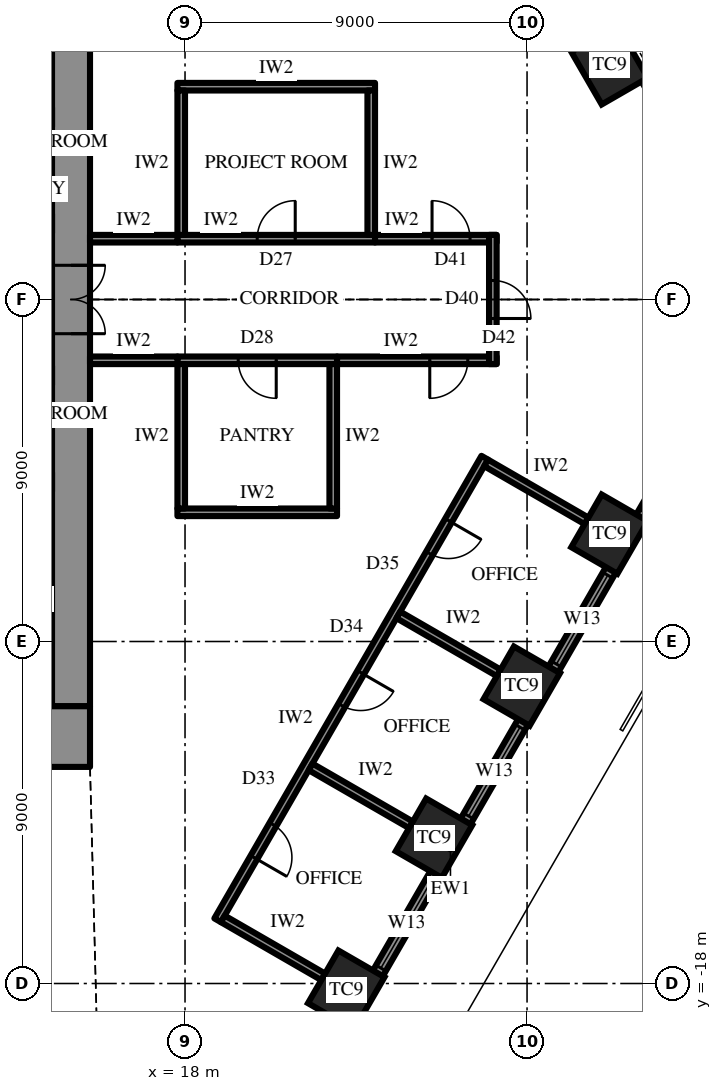
"""IFC4 building model, lengths in metres.
Left out: names, types, materials, properties, quantities, classifications, styles, units other than length and angle.
Written with IfcOpenShell. Run it as: python <this file> out.ifc"""

import sys

from ifc_helpers import new_model, si_unit, direction, frame, frame_2d, origin, origin_2d, place, context, subcontext, project, spatial, rectangle, extrude, element, fill, save


model = new_model("IFC4")
c1 = context("Model", 3, precision=1e-05, world=origin(), true_north=direction((0.0, 1.0)))
c2 = subcontext(c1, "Body", "Model", "MODEL_VIEW")
j1 = project(units=[si_unit("LENGTHUNIT", "METRE"), si_unit("PLANEANGLEUNIT", "RADIAN")], contexts=[c1])
p1 = place(None, origin())
s1 = spatial("IfcSite", under=j1, at=p1, CompositionType="ELEMENT")
p2 = place(p1, origin())
s2 = spatial("IfcBuilding", under=s1, at=p2, CompositionType="ELEMENT")
p3 = place(p2, frame((0.0, 0.0, 223.9)))
s3 = spatial("IfcBuildingStorey", under=s2, at=p3, CompositionType="ELEMENT", Elevation=223.9)
for number, where, z_axis, x_axis in (
    (1, (29.171, 6.175, 0.0), (0.0, 0.0, 1.0), (-0.5, 0.866, 0.0)),
    (2, (22.242, -18.175, 0.0), (0.0, 0.0, 1.0), (0.5, 0.866, 0.0)),
    (3, (24.552, -14.175, 0.0), (0.0, 0.0, 1.0), (0.5, 0.866, 0.0)),
    (4, (26.861, -10.175, 0.0), (0.0, 0.0, 1.0), (0.5, 0.866, 0.0)),
    (5, (29.171, -6.175, 0.0), (0.0, 0.0, 1.0), (0.5, 0.866, 0.0)),
):
    element("IfcColumn", number, at=place(p3, frame(where, z_axis=z_axis, x_axis=x_axis)), inside=s3, PredefinedType="COLUMN", context=c2, shape_type="SweptSolid", body=[
        extrude(rectangle(XDim=1.6, YDim=1.4, at=origin_2d()), origin(), (0.0, 0.0, 1.0), 4.2),
    ])
p4 = place(p3, frame((15.5, -11.5, 0.0), z_axis=(0.0, 0.0, 1.0), x_axis=(-1.0, 0.0, 0.0)))
e6 = element("IfcWall", 6, at=p4, inside=s3, PredefinedType="SHEAR", context=c2, shape_type="SweptSolid", body=[
    extrude(rectangle(XDim=31.0, YDim=1.6, at=frame_2d((15.5, 0.0))), origin(), (0.0, 0.0, 1.0), 4.2),
])
p5 = place(p4, frame((16.35, 0.0, 0.0)))
e7 = element("IfcOpeningElement", 7, at=p5, cuts=e6, PredefinedType="OPENING", context=c2, shape_type="SweptSolid", body=[
    extrude(rectangle(XDim=0.9, YDim=2.2, at=frame_2d((0.45, 1.1))), frame((0.0, 0.81, 0.0), z_axis=(0.0, -1.0, 0.0), x_axis=(1.0, 0.0, 0.0)), (0.0, 0.0, 1.0), 1.62),
])
p6 = place(p4, frame((19.35, 0.0, 0.0)))
e8 = element("IfcOpeningElement", 8, at=p6, cuts=e6, PredefinedType="OPENING", context=c2, shape_type="SweptSolid", body=[
    extrude(rectangle(XDim=0.9, YDim=2.2, at=frame_2d((0.45, 1.1))), frame((0.0, 0.81, 0.0), z_axis=(0.0, -1.0, 0.0), x_axis=(1.0, 0.0, 0.0)), (0.0, 0.0, 1.0), 1.62),
])
p7 = place(p4, frame((22.4, 0.0, 0.0)))
e9 = element("IfcOpeningElement", 9, at=p7, cuts=e6, PredefinedType="OPENING", context=c2, shape_type="SweptSolid", body=[
    extrude(rectangle(XDim=1.0, YDim=2.2, at=frame_2d((0.5, 1.1))), frame((0.0, 0.81, 0.0), z_axis=(0.0, -1.0, 0.0), x_axis=(1.0, 0.0, 0.0)), (0.0, 0.0, 1.0), 1.62),
])
p8 = place(p4, frame((1.65, 0.0, 0.0)))
e10 = element("IfcOpeningElement", 10, at=p8, cuts=e6, PredefinedType="OPENING", context=c2, shape_type="SweptSolid", body=[
    extrude(rectangle(XDim=0.9, YDim=2.2, at=frame_2d((0.45, 1.1))), frame((0.0, 0.81, 0.0), z_axis=(0.0, -1.0, 0.0), x_axis=(1.0, 0.0, 0.0)), (0.0, 0.0, 1.0), 1.62),
])
p9 = place(p4, frame((4.65, 0.0, 0.0)))
e11 = element("IfcOpeningElement", 11, at=p9, cuts=e6, PredefinedType="OPENING", context=c2, shape_type="SweptSolid", body=[
    extrude(rectangle(XDim=0.9, YDim=2.2, at=frame_2d((0.45, 1.1))), frame((0.0, 0.81, 0.0), z_axis=(0.0, -1.0, 0.0), x_axis=(1.0, 0.0, 0.0)), (0.0, 0.0, 1.0), 1.62),
])
p10 = place(p4, frame((25.45, 0.0, 0.0)))
e12 = element("IfcOpeningElement", 12, at=p10, cuts=e6, PredefinedType="OPENING", context=c2, shape_type="SweptSolid", body=[
    extrude(rectangle(XDim=0.9, YDim=2.2, at=frame_2d((0.45, 1.1))), frame((0.0, 0.81, 0.0), z_axis=(0.0, -1.0, 0.0), x_axis=(1.0, 0.0, 0.0)), (0.0, 0.0, 1.0), 1.62),
])
p11 = place(p4, frame((28.45, 0.0, 0.0)))
e13 = element("IfcOpeningElement", 13, at=p11, cuts=e6, PredefinedType="OPENING", context=c2, shape_type="SweptSolid", body=[
    extrude(rectangle(XDim=0.9, YDim=2.2, at=frame_2d((0.45, 1.1))), frame((0.0, 0.81, 0.0), z_axis=(0.0, -1.0, 0.0), x_axis=(1.0, 0.0, 0.0)), (0.0, 0.0, 1.0), 1.62),
])
p12 = place(p3, frame((15.0, -10.7, 0.0), z_axis=(0.0, 0.0, 1.0), x_axis=(0.0, 1.0, 0.0)))
e14 = element("IfcWall", 14, at=p12, inside=s3, PredefinedType="SHEAR", context=c2, shape_type="SweptSolid", body=[
    extrude(rectangle(XDim=21.4, YDim=1.0, at=frame_2d((10.7, 0.0))), origin(), (0.0, 0.0, 1.0), 4.2),
])
p13 = place(p12, frame((9.8, 0.0, 0.0)))
e15 = element("IfcOpeningElement", 15, at=p13, cuts=e14, PredefinedType="OPENING", context=c2, shape_type="SweptSolid", body=[
    extrude(rectangle(XDim=1.8, YDim=2.4, at=frame_2d((0.9, 1.2))), frame((0.0, 0.51, 0.0), z_axis=(0.0, -1.0, 0.0), x_axis=(1.0, 0.0, 0.0)), (0.0, 0.0, 1.0), 1.02),
])
p14 = place(p3, frame((12.3, 2.0, 0.0), z_axis=(0.0, 0.0, 1.0), x_axis=(1.0, 0.0, 0.0)))
e16 = element("IfcWall", 16, at=p14, inside=s3, PredefinedType="SHEAR", context=c2, shape_type="SweptSolid", body=[
    extrude(rectangle(XDim=2.2, YDim=0.5, at=frame_2d((1.1, 0.0))), origin(), (0.0, 0.0, 1.0), 4.2),
])
p15 = place(p14, frame((0.8, 0.0, 0.0)))
e17 = element("IfcOpeningElement", 17, at=p15, cuts=e16, PredefinedType="OPENING", context=c2, shape_type="SweptSolid", body=[
    extrude(rectangle(XDim=0.9, YDim=2.2, at=frame_2d((0.45, 1.1))), frame((0.0, 0.26, 0.0), z_axis=(0.0, -1.0, 0.0), x_axis=(1.0, 0.0, 0.0)), (0.0, 0.0, 1.0), 0.52),
])
p16 = place(p3, frame((12.3, 4.8, 0.0), z_axis=(0.0, 0.0, 1.0), x_axis=(1.0, 0.0, 0.0)))
e18 = element("IfcWall", 18, at=p16, inside=s3, PredefinedType="SHEAR", context=c2, shape_type="SweptSolid", body=[
    extrude(rectangle(XDim=2.2, YDim=0.5, at=frame_2d((1.1, 0.0))), origin(), (0.0, 0.0, 1.0), 4.2),
])
p17 = place(p3, frame((18.057, -26.425, 0.0), z_axis=(0.0, 0.0, 1.0), x_axis=(0.500001051461, 0.866024796723, 0.0)))
e19 = element("IfcWall", 19, at=p17, inside=s3, PredefinedType="SOLIDWALL", context=c2, shape_type="SweptSolid", body=[
    extrude(rectangle(XDim=27.713, YDim=0.3, at=frame_2d((13.856, 0.0))), origin(), (0.0, 0.0, 1.0), 2.0),
])
p18 = place(p17, frame((0.959, 0.0, 0.6)))
e20 = element("IfcOpeningElement", 20, at=p18, cuts=e19, PredefinedType="OPENING", context=c2, shape_type="SweptSolid", body=[
    extrude(rectangle(XDim=2.7, YDim=1.15, at=frame_2d((1.35, 0.575))), frame((0.0, 0.16, 0.0), z_axis=(0.0, -1.0, 0.0), x_axis=(1.0, 0.0, 0.0)), (0.0, 0.0, 1.0), 0.32),
])
p19 = place(p17, frame((5.578, 0.0, 0.6)))
e21 = element("IfcOpeningElement", 21, at=p19, cuts=e19, PredefinedType="OPENING", context=c2, shape_type="SweptSolid", body=[
    extrude(rectangle(XDim=2.7, YDim=1.15, at=frame_2d((1.35, 0.575))), frame((0.0, 0.16, 0.0), z_axis=(0.0, -1.0, 0.0), x_axis=(1.0, 0.0, 0.0)), (0.0, 0.0, 1.0), 0.32),
])
p20 = place(p17, frame((10.197, 0.0, 0.6)))
e22 = element("IfcOpeningElement", 22, at=p20, cuts=e19, PredefinedType="OPENING", context=c2, shape_type="SweptSolid", body=[
    extrude(rectangle(XDim=2.7, YDim=1.15, at=frame_2d((1.35, 0.575))), frame((0.0, 0.16, 0.0), z_axis=(0.0, -1.0, 0.0), x_axis=(1.0, 0.0, 0.0)), (0.0, 0.0, 1.0), 0.32),
])
p21 = place(p17, frame((14.816, 0.0, 0.6)))
e23 = element("IfcOpeningElement", 23, at=p21, cuts=e19, PredefinedType="OPENING", context=c2, shape_type="SweptSolid", body=[
    extrude(rectangle(XDim=2.7, YDim=1.15, at=frame_2d((1.35, 0.575))), frame((0.0, 0.16, 0.0), z_axis=(0.0, -1.0, 0.0), x_axis=(1.0, 0.0, 0.0)), (0.0, 0.0, 1.0), 0.32),
])
p22 = place(p17, frame((19.435, 0.0, 0.6)))
e24 = element("IfcOpeningElement", 24, at=p22, cuts=e19, PredefinedType="OPENING", context=c2, shape_type="SweptSolid", body=[
    extrude(rectangle(XDim=2.7, YDim=1.15, at=frame_2d((1.35, 0.575))), frame((0.0, 0.16, 0.0), z_axis=(0.0, -1.0, 0.0), x_axis=(1.0, 0.0, 0.0)), (0.0, 0.0, 1.0), 0.32),
])
p23 = place(p17, frame((24.053, 0.0, 0.6)))
e25 = element("IfcOpeningElement", 25, at=p23, cuts=e19, PredefinedType="OPENING", context=c2, shape_type="SweptSolid", body=[
    extrude(rectangle(XDim=2.7, YDim=1.15, at=frame_2d((1.35, 0.575))), frame((0.0, 0.16, 0.0), z_axis=(0.0, -1.0, 0.0), x_axis=(1.0, 0.0, 0.0)), (0.0, 0.0, 1.0), 0.32),
])
p24 = place(p3, frame((18.858, -16.337, 0.0), z_axis=(0.0, 0.0, 1.0), x_axis=(0.500002095642, 0.866024193862, 0.0)))
e26 = element("IfcWall", 26, at=p24, inside=s3, PredefinedType="PARTITIONING", context=c2, shape_type="SweptSolid", body=[
    extrude(rectangle(XDim=14.057, YDim=0.2, at=frame_2d((7.028, 0.0))), origin(), (0.0, 0.0, 1.0), 4.0),
])
p25 = place(p24, frame((1.909, 0.0, 0.0)))
e27 = element("IfcOpeningElement", 27, at=p25, cuts=e26, PredefinedType="OPENING", context=c2, shape_type="SweptSolid", body=[
    extrude(rectangle(XDim=1.0, YDim=2.2, at=frame_2d((0.5, 1.1))), frame((0.0, 0.11, 0.0), z_axis=(0.0, -1.0, 0.0), x_axis=(1.0, 0.0, 0.0)), (0.0, 0.0, 1.0), 0.22),
])
p26 = place(p24, frame((6.528, 0.0, 0.0)))
e28 = element("IfcOpeningElement", 28, at=p26, cuts=e26, PredefinedType="OPENING", context=c2, shape_type="SweptSolid", body=[
    extrude(rectangle(XDim=1.0, YDim=2.2, at=frame_2d((0.5, 1.1))), frame((0.0, 0.11, 0.0), z_axis=(0.0, -1.0, 0.0), x_axis=(1.0, 0.0, 0.0)), (0.0, 0.0, 1.0), 0.22),
])
p27 = place(p24, frame((11.147, 0.0, 0.0)))
e29 = element("IfcOpeningElement", 29, at=p27, cuts=e26, PredefinedType="OPENING", context=c2, shape_type="SweptSolid", body=[
    extrude(rectangle(XDim=1.0, YDim=2.2, at=frame_2d((0.5, 1.1))), frame((0.0, 0.11, 0.0), z_axis=(0.0, -1.0, 0.0), x_axis=(1.0, 0.0, 0.0)), (0.0, 0.0, 1.0), 0.22),
])
for number, where, z_axis, x_axis in (
    (30, (18.995, -16.3, 0.0), (0.0, 0.0, 1.0), (0.866, -0.5, 0.0)),
    (31, (21.304, -12.3, 0.0), (0.0, 0.0, 1.0), (0.866, -0.5, 0.0)),
    (32, (23.614, -8.3, 0.0), (0.0, 0.0, 1.0), (0.866, -0.5, 0.0)),
    (33, (25.923, -4.3, 0.0), (0.0, 0.0, 1.0), (0.866, -0.5, 0.0)),
):
    element("IfcWall", number, at=place(p3, frame(where, z_axis=z_axis, x_axis=x_axis)), inside=s3, PredefinedType="PARTITIONING", context=c2, shape_type="SweptSolid", body=[
        extrude(rectangle(XDim=3.05, YDim=0.2, at=frame_2d((1.525, 0.0))), origin(), (0.0, 0.0, 1.0), 3.082),
    ])
p28 = place(p3, frame((17.8, 1.6, 0.0), z_axis=(0.0, 0.0, 1.0), x_axis=(1.0, 0.0, 0.0)))
e34 = element("IfcWall", 34, at=p28, inside=s3, PredefinedType="PARTITIONING", context=c2, shape_type="SweptSolid", body=[
    extrude(rectangle(XDim=5.2, YDim=0.2, at=frame_2d((2.6, 0.0))), origin(), (0.0, 0.0, 1.0), 4.0),
])
p29 = place(p28, frame((2.1, 0.0, 0.0)))
e35 = element("IfcOpeningElement", 35, at=p29, cuts=e34, PredefinedType="OPENING", context=c2, shape_type="SweptSolid", body=[
    extrude(rectangle(XDim=1.0, YDim=2.2, at=frame_2d((0.5, 1.1))), frame((0.0, 0.11, 0.0), z_axis=(0.0, -1.0, 0.0), x_axis=(1.0, 0.0, 0.0)), (0.0, 0.0, 1.0), 0.22),
])
p30 = place(p3, frame((17.8, 5.6, 0.0), z_axis=(0.0, 0.0, 1.0), x_axis=(1.0, 0.0, 0.0)))
e36 = element("IfcWall", 36, at=p30, inside=s3, PredefinedType="PARTITIONING", context=c2, shape_type="SweptSolid", body=[
    extrude(rectangle(XDim=5.2, YDim=0.2, at=frame_2d((2.6, 0.0))), origin(), (0.0, 0.0, 1.0), 4.0),
])
for number, where, z_axis, x_axis in (
    (37, (17.9, 1.7, 0.0), (0.0, 0.0, 1.0), (0.0, 1.0, 0.0)),
    (38, (22.9, 1.7, 0.0), (0.0, 0.0, 1.0), (0.0, 1.0, 0.0)),
):
    element("IfcWall", number, at=place(p3, frame(where, z_axis=z_axis, x_axis=x_axis)), inside=s3, PredefinedType="PARTITIONING", context=c2, shape_type="SweptSolid", body=[
        extrude(rectangle(XDim=3.8, YDim=0.2, at=frame_2d((1.9, 0.0))), origin(), (0.0, 0.0, 1.0), 4.0),
    ])
p31 = place(p3, frame((17.8, -1.6, 0.0), z_axis=(0.0, 0.0, 1.0), x_axis=(1.0, 0.0, 0.0)))
e39 = element("IfcWall", 39, at=p31, inside=s3, PredefinedType="PARTITIONING", context=c2, shape_type="SweptSolid", body=[
    extrude(rectangle(XDim=4.2, YDim=0.2, at=frame_2d((2.1, 0.0))), origin(), (0.0, 0.0, 1.0), 4.0),
])
p32 = place(p31, frame((1.6, 0.0, 0.0)))
e40 = element("IfcOpeningElement", 40, at=p32, cuts=e39, PredefinedType="OPENING", context=c2, shape_type="SweptSolid", body=[
    extrude(rectangle(XDim=1.0, YDim=2.2, at=frame_2d((0.5, 1.1))), frame((0.0, 0.11, 0.0), z_axis=(0.0, -1.0, 0.0), x_axis=(1.0, 0.0, 0.0)), (0.0, 0.0, 1.0), 0.22),
])
p33 = place(p3, frame((17.8, -5.6, 0.0), z_axis=(0.0, 0.0, 1.0), x_axis=(1.0, 0.0, 0.0)))
e41 = element("IfcWall", 41, at=p33, inside=s3, PredefinedType="PARTITIONING", context=c2, shape_type="SweptSolid", body=[
    extrude(rectangle(XDim=4.2, YDim=0.2, at=frame_2d((2.1, 0.0))), origin(), (0.0, 0.0, 1.0), 4.0),
])
for number, where, z_axis, x_axis in (
    (42, (17.9, -1.7, 0.0), (0.0, 0.0, 1.0), (0.0, -1.0, 0.0)),
    (43, (21.9, -1.7, 0.0), (0.0, 0.0, 1.0), (0.0, -1.0, 0.0)),
):
    element("IfcWall", number, at=place(p3, frame(where, z_axis=z_axis, x_axis=x_axis)), inside=s3, PredefinedType="PARTITIONING", context=c2, shape_type="SweptSolid", body=[
        extrude(rectangle(XDim=3.8, YDim=0.2, at=frame_2d((1.9, 0.0))), origin(), (0.0, 0.0, 1.0), 4.0),
    ])
p34 = place(p3, frame((15.5, 1.6, 0.0), z_axis=(0.0, 0.0, 1.0), x_axis=(1.0, 0.0, 0.0)))
e44 = element("IfcWall", 44, at=p34, inside=s3, PredefinedType="PARTITIONING", context=c2, shape_type="SweptSolid", body=[
    extrude(rectangle(XDim=2.3, YDim=0.2, at=frame_2d((1.15, 0.0))), origin(), (0.0, 0.0, 1.0), 4.0),
])
p35 = place(p3, frame((23.0, 1.6, 0.0), z_axis=(0.0, 0.0, 1.0), x_axis=(1.0, 0.0, 0.0)))
e45 = element("IfcWall", 45, at=p35, inside=s3, PredefinedType="PARTITIONING", context=c2, shape_type="SweptSolid", body=[
    extrude(rectangle(XDim=3.2, YDim=0.2, at=frame_2d((1.6, 0.0))), origin(), (0.0, 0.0, 1.0), 4.0),
])
p36 = place(p35, frame((1.5, 0.0, 0.0)))
e46 = element("IfcOpeningElement", 46, at=p36, cuts=e45, PredefinedType="OPENING", context=c2, shape_type="SweptSolid", body=[
    extrude(rectangle(XDim=1.0, YDim=2.2, at=frame_2d((0.5, 1.1))), frame((0.0, 0.11, 0.0), z_axis=(0.0, -1.0, 0.0), x_axis=(1.0, 0.0, 0.0)), (0.0, 0.0, 1.0), 0.22),
])
p37 = place(p3, frame((15.5, -1.6, 0.0), z_axis=(0.0, 0.0, 1.0), x_axis=(1.0, 0.0, 0.0)))
e47 = element("IfcWall", 47, at=p37, inside=s3, PredefinedType="PARTITIONING", context=c2, shape_type="SweptSolid", body=[
    extrude(rectangle(XDim=2.3, YDim=0.2, at=frame_2d((1.15, 0.0))), origin(), (0.0, 0.0, 1.0), 4.0),
])
p38 = place(p3, frame((22.0, -1.6, 0.0), z_axis=(0.0, 0.0, 1.0), x_axis=(1.0, 0.0, 0.0)))
e48 = element("IfcWall", 48, at=p38, inside=s3, PredefinedType="PARTITIONING", context=c2, shape_type="SweptSolid", body=[
    extrude(rectangle(XDim=4.2, YDim=0.2, at=frame_2d((2.1, 0.0))), origin(), (0.0, 0.0, 1.0), 4.0),
])
p39 = place(p38, frame((2.44, 0.0, 0.0)))
e49 = element("IfcOpeningElement", 49, at=p39, cuts=e48, PredefinedType="OPENING", context=c2, shape_type="SweptSolid", body=[
    extrude(rectangle(XDim=1.0, YDim=2.2, at=frame_2d((0.5, 1.1))), frame((0.0, 0.11, 0.0), z_axis=(0.0, -1.0, 0.0), x_axis=(1.0, 0.0, 0.0)), (0.0, 0.0, 1.0), 0.22),
])
p40 = place(p3, frame((26.1, -1.7, 0.0), z_axis=(0.0, 0.0, 1.0), x_axis=(0.0, 1.0, 0.0)))
e50 = element("IfcWall", 50, at=p40, inside=s3, PredefinedType="PARTITIONING", context=c2, shape_type="SweptSolid", body=[
    extrude(rectangle(XDim=3.4, YDim=0.2, at=frame_2d((1.7, 0.0))), origin(), (0.0, 0.0, 1.0), 4.0),
])
p41 = place(p40, frame((1.2, 0.0, 0.0)))
e51 = element("IfcOpeningElement", 51, at=p41, cuts=e50, PredefinedType="OPENING", context=c2, shape_type="SweptSolid", body=[
    extrude(rectangle(XDim=1.0, YDim=2.2, at=frame_2d((0.5, 1.1))), frame((0.0, 0.11, 0.0), z_axis=(0.0, -1.0, 0.0), x_axis=(1.0, 0.0, 0.0)), (0.0, 0.0, 1.0), 0.22),
])
p42 = place(p20, origin())
e52 = element("IfcWindow", 52, at=p42, inside=s3, PartitioningType="SINGLE_PANEL", PredefinedType="WINDOW", context=c2, shape_type="SweptSolid", body=[
    extrude(rectangle(XDim=2.7, YDim=1.15, at=frame_2d((1.35, 0.575))), frame((0.0, 0.03, 0.0), z_axis=(0.0, -1.0, 0.0), x_axis=(1.0, 0.0, 0.0)), (0.0, 0.0, 1.0), 0.06),
])
fill(e22, e52)
p43 = place(p21, origin())
e53 = element("IfcWindow", 53, at=p43, inside=s3, PartitioningType="SINGLE_PANEL", PredefinedType="WINDOW", context=c2, shape_type="SweptSolid", body=[
    extrude(rectangle(XDim=2.7, YDim=1.15, at=frame_2d((1.35, 0.575))), frame((0.0, 0.03, 0.0), z_axis=(0.0, -1.0, 0.0), x_axis=(1.0, 0.0, 0.0)), (0.0, 0.0, 1.0), 0.06),
])
fill(e23, e53)
p44 = place(p22, origin())
e54 = element("IfcWindow", 54, at=p44, inside=s3, PartitioningType="SINGLE_PANEL", PredefinedType="WINDOW", context=c2, shape_type="SweptSolid", body=[
    extrude(rectangle(XDim=2.7, YDim=1.15, at=frame_2d((1.35, 0.575))), frame((0.0, 0.03, 0.0), z_axis=(0.0, -1.0, 0.0), x_axis=(1.0, 0.0, 0.0)), (0.0, 0.0, 1.0), 0.06),
])
fill(e24, e54)
p45 = place(p13, frame((1.8, 0.0, 0.0), z_axis=(0.0, 0.0, 1.0), x_axis=(-1.0, 0.0, 0.0)))
e55 = element("IfcDoor", 55, at=p45, inside=s3, OperationType="DOUBLE_DOOR_SINGLE_SWING", PredefinedType="DOOR", context=c2, shape_type="SweptSolid", body=[
    extrude(rectangle(XDim=1.8, YDim=2.4, at=frame_2d((0.9, 1.2))), frame((0.0, 0.025, 0.0), z_axis=(0.0, -1.0, 0.0), x_axis=(1.0, 0.0, 0.0)), (0.0, 0.0, 1.0), 0.05),
])
fill(e15, e55)
p46 = place(p25, frame((1.0, 0.0, 0.0), z_axis=(0.0, 0.0, 1.0), x_axis=(-1.0, 0.0, 0.0)))
e56 = element("IfcDoor", 56, at=p46, inside=s3, OperationType="SINGLE_SWING_LEFT", PredefinedType="DOOR", context=c2, shape_type="SweptSolid", body=[
    extrude(rectangle(XDim=1.0, YDim=2.2, at=frame_2d((0.5, 1.1))), frame((0.0, 0.025, 0.0), z_axis=(0.0, -1.0, 0.0), x_axis=(1.0, 0.0, 0.0)), (0.0, 0.0, 1.0), 0.05),
])
fill(e27, e56)
p47 = place(p26, frame((1.0, 0.0, 0.0), z_axis=(0.0, 0.0, 1.0), x_axis=(-1.0, 0.0, 0.0)))
e57 = element("IfcDoor", 57, at=p47, inside=s3, OperationType="SINGLE_SWING_RIGHT", PredefinedType="DOOR", context=c2, shape_type="SweptSolid", body=[
    extrude(rectangle(XDim=1.0, YDim=2.2, at=frame_2d((0.5, 1.1))), frame((0.0, 0.025, 0.0), z_axis=(0.0, -1.0, 0.0), x_axis=(1.0, 0.0, 0.0)), (0.0, 0.0, 1.0), 0.05),
])
fill(e28, e57)
p48 = place(p27, frame((1.0, 0.0, 0.0), z_axis=(0.0, 0.0, 1.0), x_axis=(-1.0, 0.0, 0.0)))
e58 = element("IfcDoor", 58, at=p48, inside=s3, OperationType="SINGLE_SWING_RIGHT", PredefinedType="DOOR", context=c2, shape_type="SweptSolid", body=[
    extrude(rectangle(XDim=1.0, YDim=2.2, at=frame_2d((0.5, 1.1))), frame((0.0, 0.025, 0.0), z_axis=(0.0, -1.0, 0.0), x_axis=(1.0, 0.0, 0.0)), (0.0, 0.0, 1.0), 0.05),
])
fill(e29, e58)
p49 = place(p29, origin())
e59 = element("IfcDoor", 59, at=p49, inside=s3, OperationType="SINGLE_SWING_LEFT", PredefinedType="DOOR", context=c2, shape_type="SweptSolid", body=[
    extrude(rectangle(XDim=1.0, YDim=2.2, at=frame_2d((0.5, 1.1))), frame((0.0, 0.025, 0.0), z_axis=(0.0, -1.0, 0.0), x_axis=(1.0, 0.0, 0.0)), (0.0, 0.0, 1.0), 0.05),
])
fill(e35, e59)
p50 = place(p32, frame((1.0, 0.0, 0.0), z_axis=(0.0, 0.0, 1.0), x_axis=(-1.0, 0.0, 0.0)))
e60 = element("IfcDoor", 60, at=p50, inside=s3, OperationType="SINGLE_SWING_RIGHT", PredefinedType="DOOR", context=c2, shape_type="SweptSolid", body=[
    extrude(rectangle(XDim=1.0, YDim=2.2, at=frame_2d((0.5, 1.1))), frame((0.0, 0.025, 0.0), z_axis=(0.0, -1.0, 0.0), x_axis=(1.0, 0.0, 0.0)), (0.0, 0.0, 1.0), 0.05),
])
fill(e40, e60)
p51 = place(p36, origin())
e61 = element("IfcDoor", 61, at=p51, inside=s3, OperationType="SINGLE_SWING_RIGHT", PredefinedType="DOOR", context=c2, shape_type="SweptSolid", body=[
    extrude(rectangle(XDim=1.0, YDim=2.2, at=frame_2d((0.5, 1.1))), frame((0.0, 0.025, 0.0), z_axis=(0.0, -1.0, 0.0), x_axis=(1.0, 0.0, 0.0)), (0.0, 0.0, 1.0), 0.05),
])
fill(e46, e61)
p52 = place(p39, frame((1.0, 0.0, 0.0), z_axis=(0.0, 0.0, 1.0), x_axis=(-1.0, 0.0, 0.0)))
e62 = element("IfcDoor", 62, at=p52, inside=s3, OperationType="SINGLE_SWING_LEFT", PredefinedType="DOOR", context=c2, shape_type="SweptSolid", body=[
    extrude(rectangle(XDim=1.0, YDim=2.2, at=frame_2d((0.5, 1.1))), frame((0.0, 0.025, 0.0), z_axis=(0.0, -1.0, 0.0), x_axis=(1.0, 0.0, 0.0)), (0.0, 0.0, 1.0), 0.05),
])
fill(e49, e62)
p53 = place(p41, frame((1.0, 0.0, 0.0), z_axis=(0.0, 0.0, 1.0), x_axis=(-1.0, 0.0, 0.0)))
e63 = element("IfcDoor", 63, at=p53, inside=s3, OperationType="SINGLE_SWING_LEFT", PredefinedType="DOOR", context=c2, shape_type="SweptSolid", body=[
    extrude(rectangle(XDim=1.0, YDim=2.2, at=frame_2d((0.5, 1.1))), frame((0.0, 0.025, 0.0), z_axis=(0.0, -1.0, 0.0), x_axis=(1.0, 0.0, 0.0)), (0.0, 0.0, 1.0), 0.05),
])
fill(e51, e63)
save(model, sys.argv[1])
